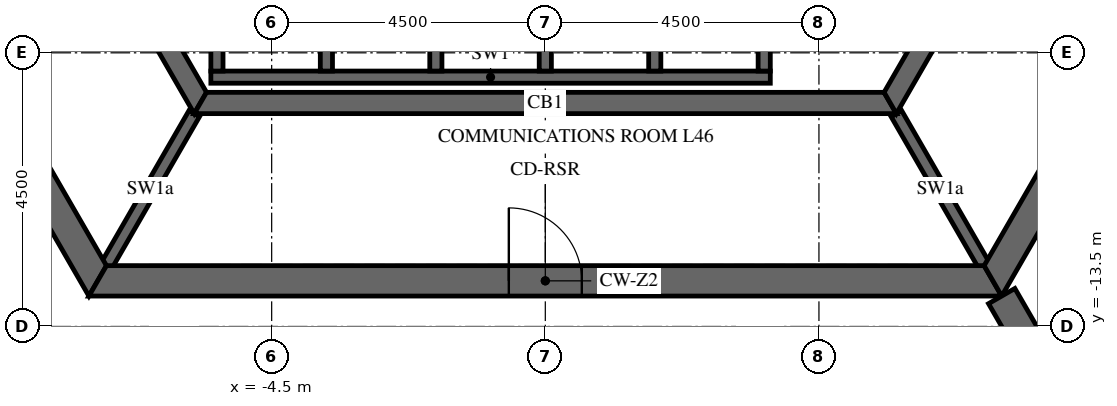
"""IFC4 building model, lengths in metres.
Left out: names, types, materials, properties, quantities, classifications, styles, units other than length and angle.
Written with IfcOpenShell. Run it as: python <this file> out.ifc"""

import sys

from ifc_helpers import new_model, si_unit, direction, frame, frame_2d, origin, place, context, subcontext, project, spatial, polyline, rectangle, outline, extrude, element, fill, save


model = new_model("IFC4")
c1 = context("Model", 3, precision=1e-05, world=origin(), true_north=direction((0.0, 1.0)))
c2 = subcontext(c1, "Body", "Model", "MODEL_VIEW")
j1 = project(units=[si_unit("LENGTHUNIT", "METRE"), si_unit("PLANEANGLEUNIT", "RADIAN")], contexts=[c1])
p1 = place(None, origin())
s1 = spatial("IfcSite", under=j1, at=p1, CompositionType="ELEMENT")
p2 = place(p1, origin())
s2 = spatial("IfcBuilding", under=s1, at=p2, CompositionType="ELEMENT")
p3 = place(p2, frame((0.0, 0.0, 195.6)))
s3 = spatial("IfcBuildingStorey", under=s2, at=p3, CompositionType="ELEMENT", Elevation=195.6)
p4 = place(p3, frame((-14.722, 0.0, -0.15), z_axis=(0.0, 0.0, 1.0), x_axis=(0.50000571537, -0.866022103989, 0.0)))
e1 = element("IfcWall", 1, at=p4, inside=s3, PredefinedType="SHEAR", context=c2, shape_type="SweptSolid", body=[
    extrude(outline(polyline([(-0.144, -0.25), (14.867, -0.25), (14.578, 0.25), (0.144, 0.25), (-0.144, -0.25)])), origin(), (0.0, 0.0, 1.0), 3.9),
])
p5 = place(p4, frame((6.432, 0.0, 0.15)))
e2 = element("IfcOpeningElement", 2, at=p5, cuts=e1, PredefinedType="OPENING", context=c2, shape_type="SweptSolid", body=[
    extrude(rectangle(XDim=1.8, YDim=2.4, at=frame_2d((0.9, 1.2))), frame((0.0, 0.26, 0.0), z_axis=(0.0, -1.0, 0.0), x_axis=(1.0, 0.0, 0.0)), (0.0, 0.0, 1.0), 0.52),
])
p6 = place(p3, frame((-7.361, -12.75, -0.15), z_axis=(0.0, 0.0, 1.0), x_axis=(1.0, 0.0, 0.0)))
e3 = element("IfcWall", 3, at=p6, inside=s3, PredefinedType="SHEAR", context=c2, shape_type="SweptSolid", body=[
    extrude(outline(polyline([(-0.144, -0.25), (14.866, -0.25), (14.578, 0.25), (0.144, 0.25), (-0.144, -0.25)])), origin(), (0.0, 0.0, 1.0), 3.9),
])
p7 = place(p6, frame((6.761, 0.0, 0.15)))
e4 = element("IfcOpeningElement", 4, at=p7, cuts=e3, PredefinedType="OPENING", context=c2, shape_type="SweptSolid", body=[
    extrude(rectangle(XDim=1.2, YDim=2.4, at=frame_2d((0.6, 1.2))), frame((0.0, 0.26, 0.0), z_axis=(0.0, -1.0, 0.0), x_axis=(1.0, 0.0, 0.0)), (0.0, 0.0, 1.0), 0.52),
])
p8 = place(p3, frame((7.361, -12.75, -0.15), z_axis=(0.0, 0.0, 1.0), x_axis=(0.50000571537, 0.866022103989, 0.0)))
e5 = element("IfcWall", 5, at=p8, inside=s3, PredefinedType="SHEAR", context=c2, shape_type="SweptSolid", body=[
    extrude(outline(polyline([(-0.144, -0.25), (14.867, -0.25), (14.578, 0.25), (0.144, 0.25), (-0.144, -0.25)])), origin(), (0.0, 0.0, 1.0), 3.9),
])
p9 = place(p8, frame((6.49, 0.0, 0.15)))
e6 = element("IfcOpeningElement", 6, at=p9, cuts=e5, PredefinedType="OPENING", context=c2, shape_type="SweptSolid", body=[
    extrude(rectangle(XDim=1.8, YDim=2.4, at=frame_2d((0.9, 1.2))), frame((0.0, 0.26, 0.0), z_axis=(0.0, -1.0, 0.0), x_axis=(1.0, 0.0, 0.0)), (0.0, 0.0, 1.0), 0.52),
])
p10 = place(p3, frame((7.506, -13.0, -0.15), z_axis=(0.0, 0.0, 1.0), x_axis=(0.499988271576, -0.866032175087, 0.0)))
e7 = element("IfcWall", 7, at=p10, inside=s3, PredefinedType="SHEAR", context=c2, shape_type="SweptSolid", body=[
    extrude(rectangle(XDim=15.424, YDim=0.5, at=frame_2d((7.712, 0.0))), origin(), (0.0, 0.0, 1.0), 3.9),
])
p11 = place(p10, frame((6.812, 0.0, 0.15)))
e8 = element("IfcOpeningElement", 8, at=p11, cuts=e7, PredefinedType="OPENING", context=c2, shape_type="SweptSolid", body=[
    extrude(rectangle(XDim=1.8, YDim=2.4, at=frame_2d((0.9, 1.2))), frame((0.0, 0.26, 0.0), z_axis=(0.0, -1.0, 0.0), x_axis=(1.0, 0.0, 0.0)), (0.0, 0.0, 1.0), 0.52),
])
p12 = place(p3, frame((-11.345, 0.0, -0.15), z_axis=(0.0, 0.0, 1.0), x_axis=(0.499995046907, -0.866028263435, 0.0)))
e9 = element("IfcWall", 9, at=p12, inside=s3, PredefinedType="SHEAR", context=c2, shape_type="SweptSolid", body=[
    extrude(outline(polyline([(-0.101, -0.175), (11.446, -0.175), (11.244, 0.175), (0.101, 0.175), (-0.101, -0.175)])), origin(), (0.0, 0.0, 1.0), 3.9),
])
p13 = place(p12, frame((4.744, 0.0, 0.15)))
e10 = element("IfcOpeningElement", 10, at=p13, cuts=e9, PredefinedType="OPENING", context=c2, shape_type="SweptSolid", body=[
    extrude(rectangle(XDim=1.8, YDim=2.4, at=frame_2d((0.9, 1.2))), frame((0.0, 0.185, 0.0), z_axis=(0.0, -1.0, 0.0), x_axis=(1.0, 0.0, 0.0)), (0.0, 0.0, 1.0), 0.37),
])
p14 = place(p3, frame((-5.673, -9.825, -0.15), z_axis=(0.0, 0.0, 1.0), x_axis=(1.0, 0.0, 0.0)))
e11 = element("IfcWall", 11, at=p14, inside=s3, PredefinedType="SHEAR", context=c2, shape_type="SweptSolid", body=[
    extrude(outline(polyline([(-0.101, -0.175), (11.446, -0.175), (11.244, 0.175), (0.101, 0.175), (-0.101, -0.175)])), origin(), (0.0, 0.0, 1.0), 3.9),
])
p15 = place(p3, frame((5.673, -9.825, -0.15), z_axis=(0.0, 0.0, 1.0), x_axis=(0.499995046907, 0.866028263435, 0.0)))
e12 = element("IfcWall", 12, at=p15, inside=s3, PredefinedType="SHEAR", context=c2, shape_type="SweptSolid", body=[
    extrude(outline(polyline([(-0.101, -0.175), (11.446, -0.175), (11.244, 0.175), (0.101, 0.175), (-0.101, -0.175)])), origin(), (0.0, 0.0, 1.0), 3.9),
])
p16 = place(p15, frame((4.801, 0.0, 0.15)))
e13 = element("IfcOpeningElement", 13, at=p16, cuts=e12, PredefinedType="OPENING", context=c2, shape_type="SweptSolid", body=[
    extrude(rectangle(XDim=1.8, YDim=2.4, at=frame_2d((0.9, 1.2))), frame((0.0, 0.185, 0.0), z_axis=(0.0, -1.0, 0.0), x_axis=(1.0, 0.0, 0.0)), (0.0, 0.0, 1.0), 0.37),
])
p17 = place(p3, frame((-5.5, -9.4, -0.25), z_axis=(0.0, 0.0, 1.0), x_axis=(1.0, 0.0, 0.0)))
e14 = element("IfcWall", 14, at=p17, inside=s3, PredefinedType="SHEAR", context=c2, shape_type="SweptSolid", body=[
    extrude(rectangle(XDim=9.2, YDim=0.2, at=frame_2d((4.6, 0.0))), origin(), (0.0, 0.0, 1.0), 3.9),
])
for number, where, z_axis, x_axis in (
    (15, (-5.4, -9.3, -0.25), (0.0, 0.0, 1.0), (0.0, 1.0, 0.0)),
    (16, (-3.6, -9.3, -0.25), (0.0, 0.0, 1.0), (0.0, 1.0, 0.0)),
    (17, (-1.8, -9.3, -0.25), (0.0, 0.0, 1.0), (0.0, 1.0, 0.0)),
    (18, (0.0, -9.3, -0.25), (0.0, 0.0, 1.0), (0.0, 1.0, 0.0)),
    (19, (1.8, -9.3, -0.25), (0.0, 0.0, 1.0), (0.0, 1.0, 0.0)),
    (20, (3.6, -9.3, -0.25), (0.0, 0.0, 1.0), (0.0, 1.0, 0.0)),
):
    element("IfcWall", number, at=place(p3, frame(where, z_axis=z_axis, x_axis=x_axis)), inside=s3, PredefinedType="SHEAR", context=c2, shape_type="SweptSolid", body=[
        extrude(rectangle(XDim=2.9, YDim=0.2, at=frame_2d((1.45, 0.0))), origin(), (0.0, 0.0, 1.0), 3.9),
    ])
for number, where, z_axis, x_axis in (
    (21, (-5.773, -10.0, -0.15), (0.0, 0.0, 1.0), (-0.5, -0.866, 0.0)),
    (22, (5.773, -10.0, -0.15), (0.0, 0.0, 1.0), (0.5, -0.866, 0.0)),
):
    element("IfcWall", number, at=place(p3, frame(where, z_axis=z_axis, x_axis=x_axis)), inside=s3, PredefinedType="SHEAR", context=c2, shape_type="SweptSolid", body=[
        extrude(rectangle(XDim=2.887, YDim=0.2, at=frame_2d((1.443, 0.0))), origin(), (0.0, 0.0, 1.0), 3.9),
    ])
p18 = place(p7, origin())
e23 = element("IfcDoor", 23, at=p18, inside=s3, OperationType="SINGLE_SWING_LEFT", PredefinedType="DOOR", context=c2, shape_type="SweptSolid", body=[
    extrude(rectangle(XDim=1.2, YDim=2.4, at=frame_2d((0.6, 1.2))), frame((0.0, 0.025, 0.0), z_axis=(0.0, -1.0, 0.0), x_axis=(1.0, 0.0, 0.0)), (0.0, 0.0, 1.0), 0.05),
])
fill(e4, e23)
save(model, sys.argv[1])
